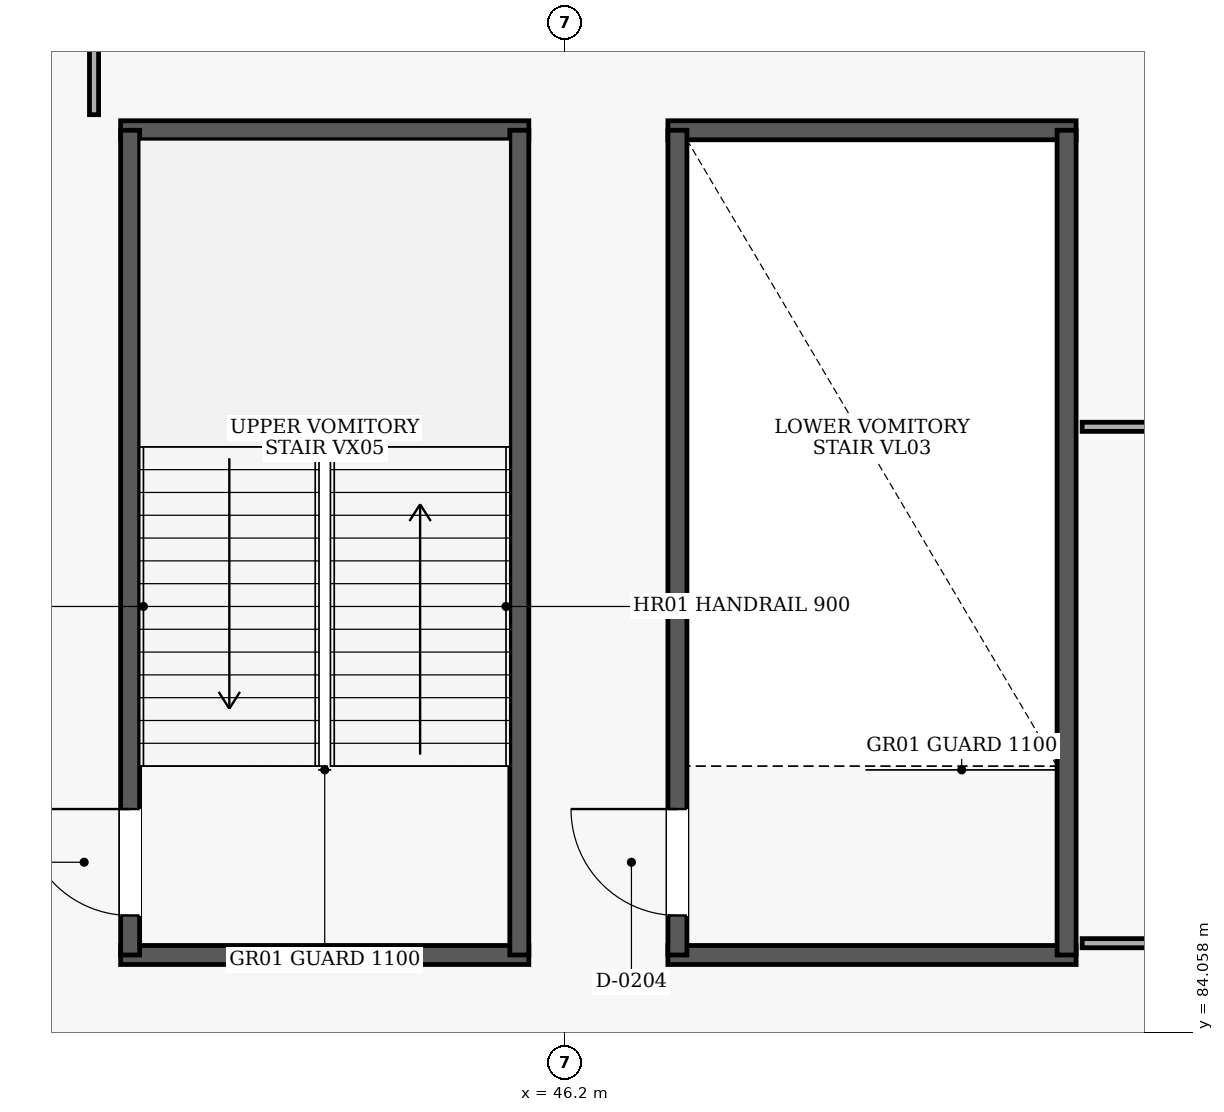
"""IFC4 building model, lengths in metres.
Left out: names, types, materials, properties, quantities, classifications, styles, units other than length and angle.
Written with IfcOpenShell. Run it as: python <this file> out.ifc"""

import sys

from ifc_helpers import new_model, si_unit, direction, frame, frame_2d, origin, place, context, subcontext, project, spatial, rectangle, extrude, element, fill, save


model = new_model("IFC4")
c1 = context("Model", 3, precision=1e-05, world=origin(), true_north=direction((0.0, 1.0)))
c2 = subcontext(c1, "Body", "Model", "MODEL_VIEW")
j1 = project(units=[si_unit("LENGTHUNIT", "METRE"), si_unit("PLANEANGLEUNIT", "RADIAN")], contexts=[c1])
p1 = place(None, origin())
s1 = spatial("IfcSite", under=j1, at=p1, CompositionType="ELEMENT")
p2 = place(p1, origin())
s2 = spatial("IfcBuilding", under=s1, at=p2, CompositionType="ELEMENT")
p3 = place(p2, frame((0.0, 0.0, 5.4)))
s3 = spatial("IfcBuildingStorey", under=s2, at=p3, CompositionType="ELEMENT", Elevation=5.4)
for number, where, z_axis, x_axis in (
    (1, (40.35, 85.075, 0.0), (0.0, 0.0, 1.0), (1.0, 0.0, 0.0)),
    (2, (45.72, 95.925, 0.0), (0.0, 0.0, 1.0), (-1.0, 0.0, 0.0)),
):
    element("IfcWall", number, at=place(p3, frame(where, z_axis=z_axis, x_axis=x_axis)), inside=s3, PredefinedType="SHEAR", context=c2, shape_type="SweptSolid", body=[
        extrude(rectangle(XDim=5.37, YDim=0.25, at=frame_2d((2.685, 0.0))), origin(), (0.0, 0.0, 1.0), 4.5),
    ])
p4 = place(p3, frame((40.475, 85.075, 0.0), z_axis=(0.0, 0.0, 1.0), x_axis=(0.0, 1.0, 0.0)))
e3 = element("IfcWall", 3, at=p4, inside=s3, PredefinedType="SHEAR", context=c2, shape_type="SweptSolid", body=[
    extrude(rectangle(XDim=10.85, YDim=0.25, at=frame_2d((5.425, 0.0))), origin(), (0.0, 0.0, 1.0), 4.5),
])
p5 = place(p4, frame((0.52, 0.0, 0.0)))
e4 = element("IfcOpeningElement", 4, at=p5, cuts=e3, PredefinedType="OPENING", context=c2, shape_type="SweptSolid", body=[
    extrude(rectangle(XDim=1.4, YDim=2.15, at=frame_2d((0.7, 1.075))), frame((0.0, 0.135, 0.0), z_axis=(0.0, -1.0, 0.0), x_axis=(1.0, 0.0, 0.0)), (0.0, 0.0, 1.0), 0.27),
])
p6 = place(p3, frame((45.595, 85.075, 0.0), z_axis=(0.0, 0.0, 1.0), x_axis=(0.0, 1.0, 0.0)))
e5 = element("IfcWall", 5, at=p6, inside=s3, PredefinedType="SHEAR", context=c2, shape_type="SweptSolid", body=[
    extrude(rectangle(XDim=10.85, YDim=0.25, at=frame_2d((5.425, 0.0))), origin(), (0.0, 0.0, 1.0), 4.5),
])
for number, where, z_axis, x_axis in (
    (6, (47.55, 85.075, 0.0), (0.0, 0.0, 1.0), (1.0, 0.0, 0.0)),
    (7, (52.92, 95.925, 0.0), (0.0, 0.0, 1.0), (-1.0, 0.0, 0.0)),
):
    element("IfcWall", number, at=place(p3, frame(where, z_axis=z_axis, x_axis=x_axis)), inside=s3, PredefinedType="SHEAR", context=c2, shape_type="SweptSolid", body=[
        extrude(rectangle(XDim=5.37, YDim=0.25, at=frame_2d((2.685, 0.0))), origin(), (0.0, 0.0, 1.0), 4.5),
    ])
p7 = place(p3, frame((47.675, 85.075, 0.0), z_axis=(0.0, 0.0, 1.0), x_axis=(0.0, 1.0, 0.0)))
e8 = element("IfcWall", 8, at=p7, inside=s3, PredefinedType="SHEAR", context=c2, shape_type="SweptSolid", body=[
    extrude(rectangle(XDim=10.85, YDim=0.25, at=frame_2d((5.425, 0.0))), origin(), (0.0, 0.0, 1.0), 4.5),
])
p8 = place(p7, frame((0.52, 0.0, 0.0)))
e9 = element("IfcOpeningElement", 9, at=p8, cuts=e8, PredefinedType="OPENING", context=c2, shape_type="SweptSolid", body=[
    extrude(rectangle(XDim=1.4, YDim=2.15, at=frame_2d((0.7, 1.075))), frame((0.0, 0.135, 0.0), z_axis=(0.0, -1.0, 0.0), x_axis=(1.0, 0.0, 0.0)), (0.0, 0.0, 1.0), 0.27),
])
p9 = place(p3, frame((52.795, 85.075, 0.0), z_axis=(0.0, 0.0, 1.0), x_axis=(0.0, 1.0, 0.0)))
e10 = element("IfcWall", 10, at=p9, inside=s3, PredefinedType="SHEAR", context=c2, shape_type="SweptSolid", body=[
    extrude(rectangle(XDim=10.85, YDim=0.25, at=frame_2d((5.425, 0.0))), origin(), (0.0, 0.0, 1.0), 4.5),
])
p10 = place(p3, frame((53.0, 85.23, 0.0), z_axis=(0.0, 0.0, 1.0), x_axis=(1.0, 0.0, 0.0)))
e11 = element("IfcWall", 11, at=p10, inside=s3, PredefinedType="PARTITIONING", context=c2, shape_type="SweptSolid", body=[
    extrude(rectangle(XDim=15.4, YDim=0.12, at=frame_2d((7.7, 0.0))), origin(), (0.0, 0.0, 1.0), 4.5),
])
p11 = place(p10, frame((5.978, 0.0, 0.0)))
e12 = element("IfcOpeningElement", 12, at=p11, cuts=e11, PredefinedType="OPENING", context=c2, shape_type="SweptSolid", body=[
    extrude(rectangle(XDim=1.3, YDim=2.2, at=frame_2d((0.65, 1.1))), frame((0.0, 0.07, 0.0), z_axis=(0.0, -1.0, 0.0), x_axis=(1.0, 0.0, 0.0)), (0.0, 0.0, 1.0), 0.14),
])
p12 = place(p3, frame((68.4, 92.024, 0.0), z_axis=(0.0, 0.0, 1.0), x_axis=(-1.0, 0.0, 0.0)))
e13 = element("IfcWall", 13, at=p12, inside=s3, PredefinedType="PARTITIONING", context=c2, shape_type="SweptSolid", body=[
    extrude(rectangle(XDim=15.4, YDim=0.12, at=frame_2d((7.7, 0.0))), origin(), (0.0, 0.0, 1.0), 4.5),
])
p13 = place(p3, frame((40.0, 99.27, 0.0), z_axis=(0.0, 0.0, 1.0), x_axis=(0.0, -1.0, 0.0)))
e14 = element("IfcWall", 14, at=p13, inside=s3, PredefinedType="PARTITIONING", context=c2, shape_type="SweptSolid", body=[
    extrude(rectangle(XDim=3.14, YDim=0.12, at=frame_2d((1.57, 0.0))), origin(), (0.0, 0.0, 1.0), 4.5),
])
p14 = place(p13, frame((0.87, 0.0, 0.0)))
e15 = element("IfcOpeningElement", 15, at=p14, cuts=e14, PredefinedType="OPENING", context=c2, shape_type="SweptSolid", body=[
    extrude(rectangle(XDim=1.4, YDim=2.2, at=frame_2d((0.7, 1.1))), frame((0.0, 0.07, 0.0), z_axis=(0.0, -1.0, 0.0), x_axis=(1.0, 0.0, 0.0)), (0.0, 0.0, 1.0), 0.14),
])
p15 = place(p5, frame((1.4, 0.0, 0.0), z_axis=(0.0, 0.0, 1.0), x_axis=(-1.0, 0.0, 0.0)))
e16 = element("IfcDoor", 16, at=p15, inside=s3, OperationType="SINGLE_SWING_LEFT", PredefinedType="DOOR", context=c2, shape_type="SweptSolid", body=[
    extrude(rectangle(XDim=1.4, YDim=2.15, at=frame_2d((0.7, 1.075))), frame((0.0, 0.025, 0.0), z_axis=(0.0, -1.0, 0.0), x_axis=(1.0, 0.0, 0.0)), (0.0, 0.0, 1.0), 0.05),
])
fill(e4, e16)
p16 = place(p8, frame((1.4, 0.0, 0.0), z_axis=(0.0, 0.0, 1.0), x_axis=(-1.0, 0.0, 0.0)))
e17 = element("IfcDoor", 17, at=p16, inside=s3, OperationType="SINGLE_SWING_LEFT", PredefinedType="DOOR", context=c2, shape_type="SweptSolid", body=[
    extrude(rectangle(XDim=1.4, YDim=2.15, at=frame_2d((0.7, 1.075))), frame((0.0, 0.025, 0.0), z_axis=(0.0, -1.0, 0.0), x_axis=(1.0, 0.0, 0.0)), (0.0, 0.0, 1.0), 0.05),
])
fill(e9, e17)
save(model, sys.argv[1])
